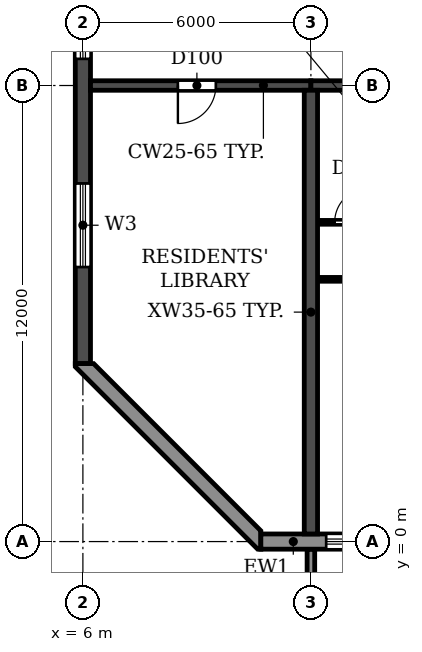
"""IFC4 building model, lengths in metres.
Left out: names, types, materials, properties, quantities, classifications, styles, units other than length and angle.
Written with IfcOpenShell. Run it as: python <this file> out.ifc"""

import sys

from ifc_helpers import new_model, si_unit, direction, frame, frame_2d, origin, place, context, subcontext, project, spatial, polyline, rectangle, outline, extrude, source, transform, mapped, element, fill, save


model = new_model("IFC4")
c1 = context("Model", 3, precision=1e-05, world=origin(), true_north=direction((0.0, 1.0)))
c2 = subcontext(c1, "Body", "Model", "MODEL_VIEW")
j1 = project(units=[si_unit("LENGTHUNIT", "METRE"), si_unit("PLANEANGLEUNIT", "RADIAN")], contexts=[c1])
p1 = place(None, origin())
s1 = spatial("IfcSite", under=j1, at=p1, CompositionType="ELEMENT")
p2 = place(p1, origin())
s2 = spatial("IfcBuilding", under=s1, at=p2, CompositionType="ELEMENT")
p3 = place(p2, frame((0.0, 0.0, 76.2)))
s3 = spatial("IfcBuildingStorey", under=s2, at=p3, CompositionType="ELEMENT", Elevation=76.2)
p4 = place(p3, frame((12.0, 0.2, 0.0), z_axis=(0.0, 0.0, 1.0), x_axis=(0.0, 1.0, 0.0)))
e1 = element("IfcWall", 1, at=p4, inside=s3, PredefinedType="SHEAR", context=c2, shape_type="SweptSolid", body=[
    extrude(rectangle(XDim=11.675, YDim=0.35, at=frame_2d((5.837, 0.0))), origin(), (0.0, 0.0, 1.0), 3.06),
])
p5 = place(p3, frame((6.0, 4.683, 0.0), z_axis=(0.0, 0.0, 1.0), x_axis=(0.0, 1.0, 0.0)))
e2 = element("IfcWall", 2, at=p5, inside=s3, PredefinedType="SHEAR", context=c2, shape_type="SweptSolid", body=[
    extrude(rectangle(XDim=34.234, YDim=0.4, at=frame_2d((17.117, 0.0))), origin(), (0.0, 0.0, 1.0), 3.06),
])
p6 = place(p5, frame((23.817, 0.0, 0.9)))
e3 = element("IfcOpeningElement", 3, at=p6, cuts=e2, PredefinedType="OPENING", context=c2, shape_type="SweptSolid", body=[
    extrude(rectangle(XDim=1.2, YDim=1.5, at=frame_2d((0.6, 0.75))), frame((0.0, 0.21, 0.0), z_axis=(0.0, -1.0, 0.0), x_axis=(1.0, 0.0, 0.0)), (0.0, 0.0, 1.0), 0.42),
])
p7 = place(p5, frame((8.017, 0.0, 0.9)))
e4 = element("IfcOpeningElement", 4, at=p7, cuts=e2, PredefinedType="OPENING", context=c2, shape_type="SweptSolid", body=[
    extrude(rectangle(XDim=1.2, YDim=1.5, at=frame_2d((0.6, 0.75))), frame((0.0, 0.21, 0.0), z_axis=(0.0, -1.0, 0.0), x_axis=(1.0, 0.0, 0.0)), (0.0, 0.0, 1.0), 0.42),
])
p8 = place(p5, frame((15.917, 0.0, 0.9)))
e5 = element("IfcOpeningElement", 5, at=p8, cuts=e2, PredefinedType="OPENING", context=c2, shape_type="SweptSolid", body=[
    extrude(rectangle(XDim=1.2, YDim=1.5, at=frame_2d((0.6, 0.75))), frame((0.0, 0.21, 0.0), z_axis=(0.0, -1.0, 0.0), x_axis=(1.0, 0.0, 0.0)), (0.0, 0.0, 1.0), 0.42),
])
p9 = place(p5, frame((28.894, 0.0, 0.6)))
e6 = element("IfcOpeningElement", 6, at=p9, cuts=e2, PredefinedType="OPENING", context=c2, shape_type="SweptSolid", body=[
    extrude(rectangle(XDim=2.2, YDim=1.8, at=frame_2d((1.1, 0.9))), frame((0.0, 0.21, 0.0), z_axis=(0.0, -1.0, 0.0), x_axis=(1.0, 0.0, 0.0)), (0.0, 0.0, 1.0), 0.42),
])
p10 = place(p5, frame((2.541, 0.0, 0.6)))
e7 = element("IfcOpeningElement", 7, at=p10, cuts=e2, PredefinedType="OPENING", context=c2, shape_type="SweptSolid", body=[
    extrude(rectangle(XDim=2.2, YDim=1.8, at=frame_2d((1.1, 0.9))), frame((0.0, 0.21, 0.0), z_axis=(0.0, -1.0, 0.0), x_axis=(1.0, 0.0, 0.0)), (0.0, 0.0, 1.0), 0.42),
])
p11 = place(p3, frame((6.2, 12.0, 0.0), z_axis=(0.0, 0.0, 1.0), x_axis=(1.0, 0.0, 0.0)))
e8 = element("IfcWall", 8, at=p11, inside=s3, PredefinedType="SHEAR", context=c2, shape_type="SweptSolid", body=[
    extrude(rectangle(XDim=5.8, YDim=0.25, at=frame_2d((2.9, 0.0))), origin(), (0.0, 0.0, 1.0), 2.46),
])
p12 = place(p11, frame((2.3, 0.0, 0.0)))
e9 = element("IfcOpeningElement", 9, at=p12, cuts=e8, PredefinedType="OPENING", context=c2, shape_type="SweptSolid", body=[
    extrude(rectangle(XDim=1.0, YDim=2.1, at=frame_2d((0.5, 1.05))), frame((0.0, 0.135, 0.0), z_axis=(0.0, -1.0, 0.0), x_axis=(1.0, 0.0, 0.0)), (0.0, 0.0, 1.0), 0.27),
])
p13 = place(p3, frame((12.0, 12.0, 0.0), z_axis=(0.0, 0.0, 1.0), x_axis=(1.0, 0.0, 0.0)))
e10 = element("IfcWall", 10, at=p13, inside=s3, PredefinedType="SHEAR", context=c2, shape_type="SweptSolid", body=[
    extrude(rectangle(XDim=6.0, YDim=0.25, at=frame_2d((3.0, 0.0))), origin(), (0.0, 0.0, 1.0), 2.46),
])
p14 = place(p13, frame((2.55, 0.0, 0.0)))
e11 = element("IfcOpeningElement", 11, at=p14, cuts=e10, PredefinedType="OPENING", context=c2, shape_type="SweptSolid", body=[
    extrude(rectangle(XDim=1.0, YDim=2.1, at=frame_2d((0.5, 1.05))), frame((0.0, 0.135, 0.0), z_axis=(0.0, -1.0, 0.0), x_axis=(1.0, 0.0, 0.0)), (0.0, 0.0, 1.0), 0.27),
])
p15 = place(p3, frame((10.683, 0.0, 0.0), z_axis=(0.0, 0.0, 1.0), x_axis=(1.0, 0.0, 0.0)))
e12 = element("IfcWall", 12, at=p15, inside=s3, PredefinedType="STANDARD", context=c2, shape_type="SweptSolid", body=[
    extrude(rectangle(XDim=80.634, YDim=0.4, at=frame_2d((40.317, 0.0))), origin(), (0.0, 0.0, 1.0), 3.06),
])
p16 = place(p15, frame((1.717, 0.0, 0.9)))
e13 = element("IfcOpeningElement", 13, at=p16, cuts=e12, PredefinedType="OPENING", context=c2, shape_type="SweptSolid", body=[
    extrude(rectangle(XDim=2.2, YDim=1.5, at=frame_2d((1.1, 0.75))), frame((0.0, 0.21, 0.0), z_axis=(0.0, -1.0, 0.0), x_axis=(1.0, 0.0, 0.0)), (0.0, 0.0, 1.0), 0.42),
])
p17 = place(p15, frame((4.917, 0.0, 0.0)))
e14 = element("IfcOpeningElement", 14, at=p17, cuts=e12, PredefinedType="OPENING", context=c2, shape_type="SweptSolid", body=[
    extrude(rectangle(XDim=1.8, YDim=2.4, at=frame_2d((0.9, 1.2))), frame((0.0, 0.21, 0.0), z_axis=(0.0, -1.0, 0.0), x_axis=(1.0, 0.0, 0.0)), (0.0, 0.0, 1.0), 0.42),
])
p18 = place(p15, frame((7.717, 0.0, 0.9)))
e15 = element("IfcOpeningElement", 15, at=p18, cuts=e12, PredefinedType="OPENING", context=c2, shape_type="SweptSolid", body=[
    extrude(rectangle(XDim=2.2, YDim=1.5, at=frame_2d((1.1, 0.75))), frame((0.0, 0.21, 0.0), z_axis=(0.0, -1.0, 0.0), x_axis=(1.0, 0.0, 0.0)), (0.0, 0.0, 1.0), 0.42),
])
p19 = place(p15, frame((10.717, 0.0, 0.9)))
e16 = element("IfcOpeningElement", 16, at=p19, cuts=e12, PredefinedType="OPENING", context=c2, shape_type="SweptSolid", body=[
    extrude(rectangle(XDim=2.2, YDim=1.5, at=frame_2d((1.1, 0.75))), frame((0.0, 0.21, 0.0), z_axis=(0.0, -1.0, 0.0), x_axis=(1.0, 0.0, 0.0)), (0.0, 0.0, 1.0), 0.42),
])
p20 = place(p15, frame((13.717, 0.0, 0.9)))
e17 = element("IfcOpeningElement", 17, at=p20, cuts=e12, PredefinedType="OPENING", context=c2, shape_type="SweptSolid", body=[
    extrude(rectangle(XDim=2.2, YDim=1.5, at=frame_2d((1.1, 0.75))), frame((0.0, 0.21, 0.0), z_axis=(0.0, -1.0, 0.0), x_axis=(1.0, 0.0, 0.0)), (0.0, 0.0, 1.0), 0.42),
])
p21 = place(p15, frame((16.917, 0.0, 0.0)))
e18 = element("IfcOpeningElement", 18, at=p21, cuts=e12, PredefinedType="OPENING", context=c2, shape_type="SweptSolid", body=[
    extrude(rectangle(XDim=1.8, YDim=2.4, at=frame_2d((0.9, 1.2))), frame((0.0, 0.21, 0.0), z_axis=(0.0, -1.0, 0.0), x_axis=(1.0, 0.0, 0.0)), (0.0, 0.0, 1.0), 0.42),
])
p22 = place(p15, frame((19.717, 0.0, 0.9)))
e19 = element("IfcOpeningElement", 19, at=p22, cuts=e12, PredefinedType="OPENING", context=c2, shape_type="SweptSolid", body=[
    extrude(rectangle(XDim=2.2, YDim=1.5, at=frame_2d((1.1, 0.75))), frame((0.0, 0.21, 0.0), z_axis=(0.0, -1.0, 0.0), x_axis=(1.0, 0.0, 0.0)), (0.0, 0.0, 1.0), 0.42),
])
p23 = place(p15, frame((22.717, 0.0, 0.9)))
e20 = element("IfcOpeningElement", 20, at=p23, cuts=e12, PredefinedType="OPENING", context=c2, shape_type="SweptSolid", body=[
    extrude(rectangle(XDim=2.2, YDim=1.5, at=frame_2d((1.1, 0.75))), frame((0.0, 0.21, 0.0), z_axis=(0.0, -1.0, 0.0), x_axis=(1.0, 0.0, 0.0)), (0.0, 0.0, 1.0), 0.42),
])
p24 = place(p15, frame((25.917, 0.0, 0.0)))
e21 = element("IfcOpeningElement", 21, at=p24, cuts=e12, PredefinedType="OPENING", context=c2, shape_type="SweptSolid", body=[
    extrude(rectangle(XDim=1.8, YDim=2.4, at=frame_2d((0.9, 1.2))), frame((0.0, 0.21, 0.0), z_axis=(0.0, -1.0, 0.0), x_axis=(1.0, 0.0, 0.0)), (0.0, 0.0, 1.0), 0.42),
])
p25 = place(p15, frame((28.717, 0.0, 0.9)))
e22 = element("IfcOpeningElement", 22, at=p25, cuts=e12, PredefinedType="OPENING", context=c2, shape_type="SweptSolid", body=[
    extrude(rectangle(XDim=2.2, YDim=1.5, at=frame_2d((1.1, 0.75))), frame((0.0, 0.21, 0.0), z_axis=(0.0, -1.0, 0.0), x_axis=(1.0, 0.0, 0.0)), (0.0, 0.0, 1.0), 0.42),
])
p26 = place(p15, frame((31.717, 0.0, 0.9)))
e23 = element("IfcOpeningElement", 23, at=p26, cuts=e12, PredefinedType="OPENING", context=c2, shape_type="SweptSolid", body=[
    extrude(rectangle(XDim=2.2, YDim=1.5, at=frame_2d((1.1, 0.75))), frame((0.0, 0.21, 0.0), z_axis=(0.0, -1.0, 0.0), x_axis=(1.0, 0.0, 0.0)), (0.0, 0.0, 1.0), 0.42),
])
p27 = place(p15, frame((34.717, 0.0, 0.9)))
e24 = element("IfcOpeningElement", 24, at=p27, cuts=e12, PredefinedType="OPENING", context=c2, shape_type="SweptSolid", body=[
    extrude(rectangle(XDim=2.2, YDim=1.5, at=frame_2d((1.1, 0.75))), frame((0.0, 0.21, 0.0), z_axis=(0.0, -1.0, 0.0), x_axis=(1.0, 0.0, 0.0)), (0.0, 0.0, 1.0), 0.42),
])
p28 = place(p15, frame((37.917, 0.0, 0.0)))
e25 = element("IfcOpeningElement", 25, at=p28, cuts=e12, PredefinedType="OPENING", context=c2, shape_type="SweptSolid", body=[
    extrude(rectangle(XDim=1.8, YDim=2.4, at=frame_2d((0.9, 1.2))), frame((0.0, 0.21, 0.0), z_axis=(0.0, -1.0, 0.0), x_axis=(1.0, 0.0, 0.0)), (0.0, 0.0, 1.0), 0.42),
])
p29 = place(p15, frame((40.717, 0.0, 0.9)))
e26 = element("IfcOpeningElement", 26, at=p29, cuts=e12, PredefinedType="OPENING", context=c2, shape_type="SweptSolid", body=[
    extrude(rectangle(XDim=2.2, YDim=1.5, at=frame_2d((1.1, 0.75))), frame((0.0, 0.21, 0.0), z_axis=(0.0, -1.0, 0.0), x_axis=(1.0, 0.0, 0.0)), (0.0, 0.0, 1.0), 0.42),
])
p30 = place(p15, frame((43.717, 0.0, 0.9)))
e27 = element("IfcOpeningElement", 27, at=p30, cuts=e12, PredefinedType="OPENING", context=c2, shape_type="SweptSolid", body=[
    extrude(rectangle(XDim=2.2, YDim=1.5, at=frame_2d((1.1, 0.75))), frame((0.0, 0.21, 0.0), z_axis=(0.0, -1.0, 0.0), x_axis=(1.0, 0.0, 0.0)), (0.0, 0.0, 1.0), 0.42),
])
p31 = place(p15, frame((46.717, 0.0, 0.9)))
e28 = element("IfcOpeningElement", 28, at=p31, cuts=e12, PredefinedType="OPENING", context=c2, shape_type="SweptSolid", body=[
    extrude(rectangle(XDim=2.2, YDim=1.5, at=frame_2d((1.1, 0.75))), frame((0.0, 0.21, 0.0), z_axis=(0.0, -1.0, 0.0), x_axis=(1.0, 0.0, 0.0)), (0.0, 0.0, 1.0), 0.42),
])
p32 = place(p15, frame((49.917, 0.0, 0.0)))
e29 = element("IfcOpeningElement", 29, at=p32, cuts=e12, PredefinedType="OPENING", context=c2, shape_type="SweptSolid", body=[
    extrude(rectangle(XDim=1.8, YDim=2.4, at=frame_2d((0.9, 1.2))), frame((0.0, 0.21, 0.0), z_axis=(0.0, -1.0, 0.0), x_axis=(1.0, 0.0, 0.0)), (0.0, 0.0, 1.0), 0.42),
])
p33 = place(p15, frame((52.717, 0.0, 0.9)))
e30 = element("IfcOpeningElement", 30, at=p33, cuts=e12, PredefinedType="OPENING", context=c2, shape_type="SweptSolid", body=[
    extrude(rectangle(XDim=2.2, YDim=1.5, at=frame_2d((1.1, 0.75))), frame((0.0, 0.21, 0.0), z_axis=(0.0, -1.0, 0.0), x_axis=(1.0, 0.0, 0.0)), (0.0, 0.0, 1.0), 0.42),
])
p34 = place(p15, frame((55.717, 0.0, 0.9)))
e31 = element("IfcOpeningElement", 31, at=p34, cuts=e12, PredefinedType="OPENING", context=c2, shape_type="SweptSolid", body=[
    extrude(rectangle(XDim=2.2, YDim=1.5, at=frame_2d((1.1, 0.75))), frame((0.0, 0.21, 0.0), z_axis=(0.0, -1.0, 0.0), x_axis=(1.0, 0.0, 0.0)), (0.0, 0.0, 1.0), 0.42),
])
p35 = place(p15, frame((58.717, 0.0, 0.9)))
e32 = element("IfcOpeningElement", 32, at=p35, cuts=e12, PredefinedType="OPENING", context=c2, shape_type="SweptSolid", body=[
    extrude(rectangle(XDim=2.2, YDim=1.5, at=frame_2d((1.1, 0.75))), frame((0.0, 0.21, 0.0), z_axis=(0.0, -1.0, 0.0), x_axis=(1.0, 0.0, 0.0)), (0.0, 0.0, 1.0), 0.42),
])
p36 = place(p15, frame((61.717, 0.0, 0.9)))
e33 = element("IfcOpeningElement", 33, at=p36, cuts=e12, PredefinedType="OPENING", context=c2, shape_type="SweptSolid", body=[
    extrude(rectangle(XDim=2.2, YDim=1.5, at=frame_2d((1.1, 0.75))), frame((0.0, 0.21, 0.0), z_axis=(0.0, -1.0, 0.0), x_axis=(1.0, 0.0, 0.0)), (0.0, 0.0, 1.0), 0.42),
])
p37 = place(p15, frame((64.917, 0.0, 0.0)))
e34 = element("IfcOpeningElement", 34, at=p37, cuts=e12, PredefinedType="OPENING", context=c2, shape_type="SweptSolid", body=[
    extrude(rectangle(XDim=1.8, YDim=2.4, at=frame_2d((0.9, 1.2))), frame((0.0, 0.21, 0.0), z_axis=(0.0, -1.0, 0.0), x_axis=(1.0, 0.0, 0.0)), (0.0, 0.0, 1.0), 0.42),
])
p38 = place(p15, frame((67.717, 0.0, 0.9)))
e35 = element("IfcOpeningElement", 35, at=p38, cuts=e12, PredefinedType="OPENING", context=c2, shape_type="SweptSolid", body=[
    extrude(rectangle(XDim=2.2, YDim=1.5, at=frame_2d((1.1, 0.75))), frame((0.0, 0.21, 0.0), z_axis=(0.0, -1.0, 0.0), x_axis=(1.0, 0.0, 0.0)), (0.0, 0.0, 1.0), 0.42),
])
p39 = place(p15, frame((70.717, 0.0, 0.9)))
e36 = element("IfcOpeningElement", 36, at=p39, cuts=e12, PredefinedType="OPENING", context=c2, shape_type="SweptSolid", body=[
    extrude(rectangle(XDim=2.2, YDim=1.5, at=frame_2d((1.1, 0.75))), frame((0.0, 0.21, 0.0), z_axis=(0.0, -1.0, 0.0), x_axis=(1.0, 0.0, 0.0)), (0.0, 0.0, 1.0), 0.42),
])
p40 = place(p15, frame((73.917, 0.0, 0.0)))
e37 = element("IfcOpeningElement", 37, at=p40, cuts=e12, PredefinedType="OPENING", context=c2, shape_type="SweptSolid", body=[
    extrude(rectangle(XDim=1.8, YDim=2.4, at=frame_2d((0.9, 1.2))), frame((0.0, 0.21, 0.0), z_axis=(0.0, -1.0, 0.0), x_axis=(1.0, 0.0, 0.0)), (0.0, 0.0, 1.0), 0.42),
])
p41 = place(p15, frame((76.717, 0.0, 0.9)))
e38 = element("IfcOpeningElement", 38, at=p41, cuts=e12, PredefinedType="OPENING", context=c2, shape_type="SweptSolid", body=[
    extrude(rectangle(XDim=2.2, YDim=1.5, at=frame_2d((1.1, 0.75))), frame((0.0, 0.21, 0.0), z_axis=(0.0, -1.0, 0.0), x_axis=(1.0, 0.0, 0.0)), (0.0, 0.0, 1.0), 0.42),
])
p42 = place(p3, origin())
e39 = element("IfcWall", 39, at=p42, inside=s3, PredefinedType="STANDARD", context=c2, shape_type="SweptSolid", body=[
    extrude(outline(polyline([(5.8, 4.683), (5.8, 4.6), (10.6, -0.2), (10.683, -0.2), (10.683, 0.283), (6.283, 4.683), (5.8, 4.683)])), origin(), (0.0, 0.0, 1.0), 3.06),
])
m1 = source(origin(), c2, "Body", "SweptSolid", [
    extrude(outline(polyline([(0.0, 0.0), (0.2, 0.0), (0.2, 1.65), (0.0, 1.65), (0.0, 0.0)])), origin(), (0.0, 0.0, 1.0), 3.1),
])
p43 = place(p3, frame((11.9, -1.85, 0.0)))
e40 = element("IfcWall", 40, at=p43, inside=s3, PredefinedType="STANDARD", context=c2, shape_type="MappedRepresentation", body=[
    mapped(m1, transform((0.0, 0.0, 0.0))),
])
p44 = place(p3, frame((12.185, 6.9, 0.0), z_axis=(0.0, 0.0, 1.0), x_axis=(1.0, 0.0, 0.0)))
e41 = element("IfcWall", 41, at=p44, inside=s3, PredefinedType="PARTITIONING", context=c2, shape_type="SweptSolid", body=[
    extrude(rectangle(XDim=2.865, YDim=0.1, at=frame_2d((1.433, 0.0))), origin(), (0.0, 0.0, 1.0), 3.06),
])
p45 = place(p44, frame((1.415, 0.0, 0.0)))
e42 = element("IfcOpeningElement", 42, at=p45, cuts=e41, PredefinedType="OPENING", context=c2, shape_type="SweptSolid", body=[
    extrude(rectangle(XDim=0.9, YDim=2.1, at=frame_2d((0.45, 1.05))), frame((0.0, 0.06, 0.0), z_axis=(0.0, -1.0, 0.0), x_axis=(1.0, 0.0, 0.0)), (0.0, 0.0, 1.0), 0.12),
])
p46 = place(p3, frame((12.185, 8.4, 0.0), z_axis=(0.0, 0.0, 1.0), x_axis=(1.0, 0.0, 0.0)))
e43 = element("IfcWall", 43, at=p46, inside=s3, PredefinedType="PARTITIONING", context=c2, shape_type="SweptSolid", body=[
    extrude(rectangle(XDim=2.015, YDim=0.1, at=frame_2d((1.007, 0.0))), origin(), (0.0, 0.0, 1.0), 3.06),
])
p47 = place(p46, frame((0.44, 0.0, 0.0)))
e44 = element("IfcOpeningElement", 44, at=p47, cuts=e43, PredefinedType="OPENING", context=c2, shape_type="SweptSolid", body=[
    extrude(rectangle(XDim=0.9, YDim=2.1, at=frame_2d((0.45, 1.05))), frame((0.0, 0.06, 0.0), z_axis=(0.0, -1.0, 0.0), x_axis=(1.0, 0.0, 0.0)), (0.0, 0.0, 1.0), 0.12),
])
p48 = place(p16, origin())
e45 = element("IfcWindow", 45, at=p48, inside=s3, PartitioningType="DOUBLE_PANEL_HORIZONTAL", PredefinedType="WINDOW", context=c2, shape_type="SweptSolid", body=[
    extrude(rectangle(XDim=2.2, YDim=1.5, at=frame_2d((1.1, 0.75))), frame((0.0, 0.03, 0.0), z_axis=(0.0, -1.0, 0.0), x_axis=(1.0, 0.0, 0.0)), (0.0, 0.0, 1.0), 0.06),
])
fill(e13, e45)
p49 = place(p7, origin())
e46 = element("IfcWindow", 46, at=p49, inside=s3, PartitioningType="SINGLE_PANEL", PredefinedType="WINDOW", context=c2, shape_type="SweptSolid", body=[
    extrude(rectangle(XDim=1.2, YDim=1.5, at=frame_2d((0.6, 0.75))), frame((0.0, 0.03, 0.0), z_axis=(0.0, -1.0, 0.0), x_axis=(1.0, 0.0, 0.0)), (0.0, 0.0, 1.0), 0.06),
])
fill(e4, e46)
p50 = place(p10, origin())
e47 = element("IfcWindow", 47, at=p50, inside=s3, PartitioningType="DOUBLE_PANEL_HORIZONTAL", PredefinedType="WINDOW", context=c2, shape_type="SweptSolid", body=[
    extrude(rectangle(XDim=2.2, YDim=1.8, at=frame_2d((1.1, 0.9))), frame((0.0, 0.03, 0.0), z_axis=(0.0, -1.0, 0.0), x_axis=(1.0, 0.0, 0.0)), (0.0, 0.0, 1.0), 0.06),
])
fill(e7, e47)
p51 = place(p12, frame((1.0, 0.0, 0.0), z_axis=(0.0, 0.0, 1.0), x_axis=(-1.0, 0.0, 0.0)))
e48 = element("IfcDoor", 48, at=p51, inside=s3, OperationType="SINGLE_SWING_RIGHT", PredefinedType="DOOR", context=c2, shape_type="SweptSolid", body=[
    extrude(rectangle(XDim=1.0, YDim=2.1, at=frame_2d((0.5, 1.05))), frame((0.0, 0.025, 0.0), z_axis=(0.0, -1.0, 0.0), x_axis=(1.0, 0.0, 0.0)), (0.0, 0.0, 1.0), 0.05),
])
fill(e9, e48)
p52 = place(p47, origin())
e49 = element("IfcDoor", 49, at=p52, inside=s3, OperationType="SINGLE_SWING_RIGHT", PredefinedType="DOOR", context=c2, shape_type="SweptSolid", body=[
    extrude(rectangle(XDim=0.9, YDim=2.1, at=frame_2d((0.45, 1.05))), frame((0.0, 0.025, 0.0), z_axis=(0.0, -1.0, 0.0), x_axis=(1.0, 0.0, 0.0)), (0.0, 0.0, 1.0), 0.05),
])
fill(e44, e49)
save(model, sys.argv[1])
